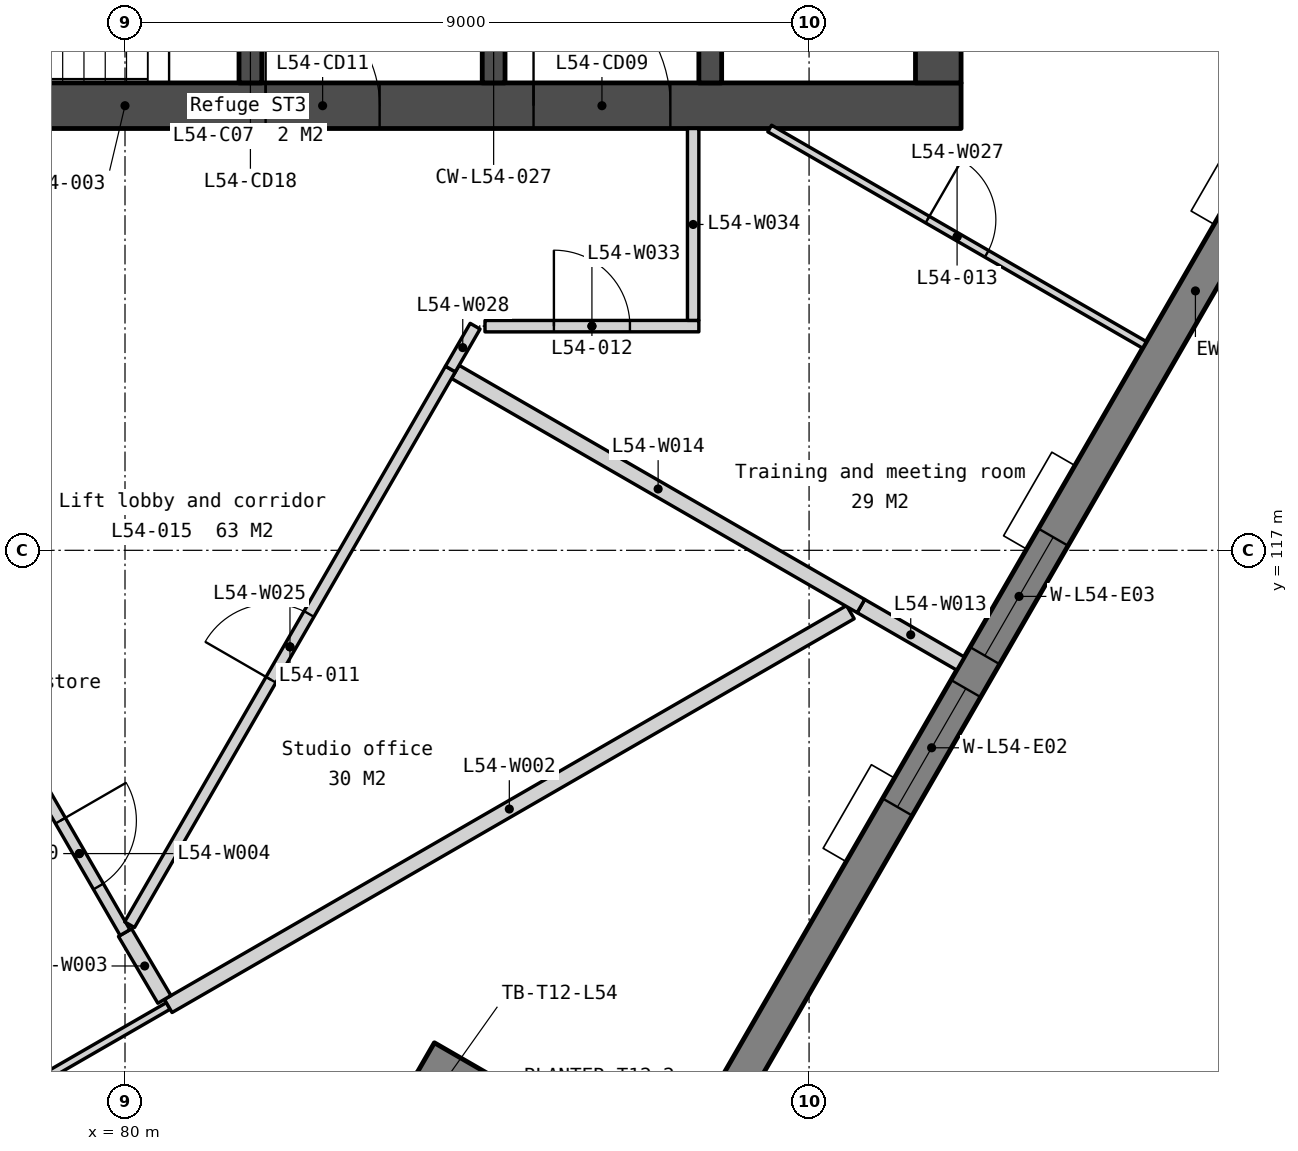
"""IFC4 building model, lengths in metres.
Left out: names, types, materials, properties, quantities, classifications, styles, units other than length and angle.
Written with IfcOpenShell. Run it as: python <this file> out.ifc"""

import sys

from ifc_helpers import new_model, si_unit, direction, frame, frame_2d, origin, place, context, subcontext, project, spatial, polyline, rectangle, outline, extrude, element, fill, save


model = new_model("IFC4")
c1 = context("Model", 3, precision=1e-05, world=origin(), true_north=direction((0.0, 1.0)))
c2 = subcontext(c1, "Body", "Model", "MODEL_VIEW")
j1 = project(units=[si_unit("LENGTHUNIT", "METRE"), si_unit("PLANEANGLEUNIT", "RADIAN")], contexts=[c1])
p1 = place(None, origin())
s1 = spatial("IfcSite", under=j1, at=p1, CompositionType="ELEMENT")
p2 = place(p1, origin())
s2 = spatial("IfcBuilding", under=s1, at=p2, CompositionType="ELEMENT")
p3 = place(p2, frame((0.0, 0.0, 215.3)))
s3 = spatial("IfcBuildingStorey", under=s2, at=p3, CompositionType="ELEMENT", Elevation=215.3)
p4 = place(p3, frame((69.0, 122.85, 0.0), z_axis=(0.0, 0.0, 1.0), x_axis=(1.0, 0.0, 0.0)))
e1 = element("IfcWall", 1, at=p4, inside=s3, PredefinedType="SOLIDWALL", context=c2, shape_type="SweptSolid", body=[
    extrude(rectangle(XDim=22.0, YDim=0.6, at=frame_2d((11.0, 0.0))), origin(), (0.0, 0.0, 1.0), 3.75),
])
p5 = place(p4, frame((16.375, 0.0, 0.0)))
e2 = element("IfcOpeningElement", 2, at=p5, cuts=e1, PredefinedType="OPENING", context=c2, shape_type="SweptSolid", body=[
    extrude(rectangle(XDim=1.8, YDim=2.1, at=frame_2d((0.9, 1.05))), frame((0.0, 0.31, 0.0), z_axis=(0.0, -1.0, 0.0), x_axis=(1.0, 0.0, 0.0)), (0.0, 0.0, 1.0), 0.62),
])
p6 = place(p4, frame((3.825, 0.0, 0.0)))
e3 = element("IfcOpeningElement", 3, at=p6, cuts=e1, PredefinedType="OPENING", context=c2, shape_type="SweptSolid", body=[
    extrude(rectangle(XDim=1.8, YDim=2.1, at=frame_2d((0.9, 1.05))), frame((0.0, 0.31, 0.0), z_axis=(0.0, -1.0, 0.0), x_axis=(1.0, 0.0, 0.0)), (0.0, 0.0, 1.0), 0.62),
])
p7 = place(p4, frame((12.85, 0.0, 0.0)))
e4 = element("IfcOpeningElement", 4, at=p7, cuts=e1, PredefinedType="OPENING", context=c2, shape_type="SweptSolid", body=[
    extrude(rectangle(XDim=1.5, YDim=2.1, at=frame_2d((0.75, 1.05))), frame((0.0, 0.31, 0.0), z_axis=(0.0, -1.0, 0.0), x_axis=(1.0, 0.0, 0.0)), (0.0, 0.0, 1.0), 0.62),
])
p8 = place(p3, frame((81.65, 125.7, 0.0), z_axis=(0.0, 0.0, 1.0), x_axis=(0.0, -1.0, 0.0)))
e5 = element("IfcWall", 5, at=p8, inside=s3, PredefinedType="SOLIDWALL", context=c2, shape_type="SweptSolid", body=[
    extrude(rectangle(XDim=2.55, YDim=0.3, at=frame_2d((1.275, 0.0))), origin(), (0.0, 0.0, 1.0), 3.75),
])
p9 = place(p8, frame((0.75, 0.0, 0.0)))
e6 = element("IfcOpeningElement", 6, at=p9, cuts=e5, PredefinedType="OPENING", context=c2, shape_type="SweptSolid", body=[
    extrude(rectangle(XDim=1.0, YDim=2.1, at=frame_2d((0.5, 1.05))), frame((0.0, 0.16, 0.0), z_axis=(0.0, -1.0, 0.0), x_axis=(1.0, 0.0, 0.0)), (0.0, 0.0, 1.0), 0.32),
])
p10 = place(p3, frame((84.85, 125.85, 0.0), z_axis=(0.0, 0.0, 1.0), x_axis=(0.0, -1.0, 0.0)))
e7 = element("IfcWall", 7, at=p10, inside=s3, PredefinedType="SOLIDWALL", context=c2, shape_type="SweptSolid", body=[
    extrude(rectangle(XDim=2.7, YDim=0.3, at=frame_2d((1.35, 0.0))), origin(), (0.0, 0.0, 1.0), 3.75),
])
p11 = place(p3, frame((87.7, 133.95, 0.0), z_axis=(0.0, 0.0, 1.0), x_axis=(0.0, -1.0, 0.0)))
e8 = element("IfcWall", 8, at=p11, inside=s3, PredefinedType="SOLIDWALL", context=c2, shape_type="SweptSolid", body=[
    extrude(rectangle(XDim=10.8, YDim=0.3, at=frame_2d((5.4, 0.0))), origin(), (0.0, 0.0, 1.0), 3.75),
])
p12 = place(p11, frame((6.95, 0.0, 0.0)))
e9 = element("IfcOpeningElement", 9, at=p12, cuts=e8, PredefinedType="OPENING", context=c2, shape_type="SweptSolid", body=[
    extrude(rectangle(XDim=1.1, YDim=2.1, at=frame_2d((0.55, 1.05))), frame((0.0, 0.16, 0.0), z_axis=(0.0, -1.0, 0.0), x_axis=(1.0, 0.0, 0.0)), (0.0, 0.0, 1.0), 0.32),
])
p13 = place(p11, frame((5.1, 0.0, 0.0)))
e10 = element("IfcOpeningElement", 10, at=p13, cuts=e8, PredefinedType="OPENING", context=c2, shape_type="SweptSolid", body=[
    extrude(rectangle(XDim=1.0, YDim=2.1, at=frame_2d((0.5, 1.05))), frame((0.0, 0.16, 0.0), z_axis=(0.0, -1.0, 0.0), x_axis=(1.0, 0.0, 0.0)), (0.0, 0.0, 1.0), 0.32),
])
p14 = place(p11, frame((9.25, 0.0, 0.0)))
e11 = element("IfcOpeningElement", 11, at=p14, cuts=e8, PredefinedType="OPENING", context=c2, shape_type="SweptSolid", body=[
    extrude(rectangle(XDim=1.1, YDim=2.1, at=frame_2d((0.55, 1.05))), frame((0.0, 0.16, 0.0), z_axis=(0.0, -1.0, 0.0), x_axis=(1.0, 0.0, 0.0)), (0.0, 0.0, 1.0), 0.32),
])
p15 = place(p3, frame((90.7, 133.95, 0.0), z_axis=(0.0, 0.0, 1.0), x_axis=(0.0, -1.0, 0.0)))
e12 = element("IfcWall", 12, at=p15, inside=s3, PredefinedType="SOLIDWALL", context=c2, shape_type="SweptSolid", body=[
    extrude(rectangle(XDim=10.8, YDim=0.6, at=frame_2d((5.4, 0.0))), origin(), (0.0, 0.0, 1.0), 3.75),
])
p16 = place(p3, frame((87.296, 108.658, -0.15), z_axis=(0.0, 0.0, 1.0), x_axis=(0.500003227337, 0.866023540472, 0.0)))
e13 = element("IfcWall", 13, at=p16, inside=s3, PredefinedType="SOLIDWALL", context=c2, shape_type="SweptSolid", body=[
    extrude(outline(polyline([(27.147, 3.9), (27.147, 0.0), (0.0, 0.0), (0.0, 3.9), (27.147, 3.9)])), frame((0.0, 0.225, 0.0), z_axis=(0.0, -1.0, 0.0), x_axis=(1.0, 0.0, 0.0)), (0.0, 0.0, 1.0), 0.45),
])
p17 = place(p16, frame((5.732, 0.0, 0.95)))
e14 = element("IfcOpeningElement", 14, at=p17, cuts=e13, PredefinedType="OPENING", context=c2, shape_type="SweptSolid", body=[
    extrude(rectangle(XDim=1.8, YDim=2.2, at=frame_2d((0.9, 1.1))), frame((0.0, 0.235, 0.0), z_axis=(0.0, -1.0, 0.0), x_axis=(1.0, 0.0, 0.0)), (0.0, 0.0, 1.0), 0.47),
])
p18 = place(p16, frame((8.032, 0.0, 0.95)))
e15 = element("IfcOpeningElement", 15, at=p18, cuts=e13, PredefinedType="OPENING", context=c2, shape_type="SweptSolid", body=[
    extrude(rectangle(XDim=1.8, YDim=2.2, at=frame_2d((0.9, 1.1))), frame((0.0, 0.235, 0.0), z_axis=(0.0, -1.0, 0.0), x_axis=(1.0, 0.0, 0.0)), (0.0, 0.0, 1.0), 0.47),
])
p19 = place(p16, frame((15.415, 0.0, 0.95)))
e16 = element("IfcOpeningElement", 16, at=p19, cuts=e13, PredefinedType="OPENING", context=c2, shape_type="SweptSolid", body=[
    extrude(rectangle(XDim=1.8, YDim=2.2, at=frame_2d((0.9, 1.1))), frame((0.0, 0.235, 0.0), z_axis=(0.0, -1.0, 0.0), x_axis=(1.0, 0.0, 0.0)), (0.0, 0.0, 1.0), 0.47),
])
p20 = place(p16, frame((17.715, 0.0, 0.95)))
e17 = element("IfcOpeningElement", 17, at=p20, cuts=e13, PredefinedType="OPENING", context=c2, shape_type="SweptSolid", body=[
    extrude(rectangle(XDim=1.8, YDim=2.2, at=frame_2d((0.9, 1.1))), frame((0.0, 0.235, 0.0), z_axis=(0.0, -1.0, 0.0), x_axis=(1.0, 0.0, 0.0)), (0.0, 0.0, 1.0), 0.47),
])
p21 = place(p16, frame((25.171, 0.0, 0.95)))
e18 = element("IfcOpeningElement", 18, at=p21, cuts=e13, PredefinedType="OPENING", context=c2, shape_type="SweptSolid", body=[
    extrude(rectangle(XDim=1.2, YDim=2.2, at=frame_2d((0.6, 1.1))), frame((0.0, 0.235, 0.0), z_axis=(0.0, -1.0, 0.0), x_axis=(1.0, 0.0, 0.0)), (0.0, 0.0, 1.0), 0.47),
])
p22 = place(p3, frame((87.379, 108.351, 0.0), z_axis=(0.0, 0.0, 1.0), x_axis=(-0.866047669374, 0.499961432884, 0.0)))
e19 = element("IfcWall", 19, at=p22, inside=s3, PredefinedType="SOLIDWALL", context=c2, shape_type="SweptSolid", body=[
    extrude(rectangle(XDim=3.95, YDim=0.45, at=frame_2d((1.975, 0.0))), origin(), (0.0, 0.0, 1.0), 7.65),
])
p23 = place(p3, frame((73.849, 107.125, 0.0), z_axis=(0.0, 0.0, 1.0), x_axis=(0.866027358884, 0.499996613652, 0.0)))
e20 = element("IfcWall", 20, at=p23, inside=s3, PredefinedType="PARTITIONING", context=c2, shape_type="SweptSolid", body=[
    extrude(rectangle(XDim=7.76, YDim=0.1, at=frame_2d((3.88, 0.0))), origin(), (0.0, 0.0, 1.0), 3.75),
])
p24 = place(p23, frame((3.43, 0.0, 0.0)))
e21 = element("IfcOpeningElement", 21, at=p24, cuts=e20, PredefinedType="OPENING", context=c2, shape_type="SweptSolid", body=[
    extrude(rectangle(XDim=0.9, YDim=2.1, at=frame_2d((0.45, 1.05))), frame((0.0, 0.06, 0.0), z_axis=(0.0, -1.0, 0.0), x_axis=(1.0, 0.0, 0.0)), (0.0, 0.0, 1.0), 0.12),
])
p25 = place(p3, frame((80.569, 111.005, 0.0), z_axis=(0.0, 0.0, 1.0), x_axis=(0.866025130863, 0.500000472714, 0.0)))
e22 = element("IfcWall", 22, at=p25, inside=s3, PredefinedType="PARTITIONING", context=c2, shape_type="SweptSolid", body=[
    extrude(rectangle(XDim=10.363, YDim=0.2, at=frame_2d((5.182, 0.0))), origin(), (0.0, 0.0, 1.0), 3.75),
])
p26 = place(p3, frame((80.0, 111.97, 0.0), z_axis=(0.0, 0.0, 1.0), x_axis=(0.507689136561, -0.861540330233, 0.0)))
e23 = element("IfcWall", 23, at=p26, inside=s3, PredefinedType="PARTITIONING", context=c2, shape_type="SweptSolid", body=[
    extrude(rectangle(XDim=1.021, YDim=0.2, at=frame_2d((0.51, 0.0))), origin(), (0.0, 0.0, 1.0), 3.75),
])
p27 = place(p3, frame((78.8, 114.049, 0.0), z_axis=(0.0, 0.0, 1.0), x_axis=(0.500001309137, -0.866024647952, 0.0)))
e24 = element("IfcWall", 24, at=p27, inside=s3, PredefinedType="PARTITIONING", context=c2, shape_type="SweptSolid", body=[
    extrude(rectangle(XDim=2.4, YDim=0.15, at=frame_2d((1.2, 0.0))), origin(), (0.0, 0.0, 1.0), 3.75),
])
p28 = place(p27, frame((0.7, 0.0, 0.0)))
e25 = element("IfcOpeningElement", 25, at=p28, cuts=e24, PredefinedType="OPENING", context=c2, shape_type="SweptSolid", body=[
    extrude(rectangle(XDim=1.0, YDim=2.1, at=frame_2d((0.5, 1.05))), frame((0.0, 0.085, 0.0), z_axis=(0.0, -1.0, 0.0), x_axis=(1.0, 0.0, 0.0)), (0.0, 0.0, 1.0), 0.17),
])
p29 = place(p3, frame((89.682, 116.267, 0.0), z_axis=(0.0, 0.0, 1.0), x_axis=(0.866000172474, -0.500043699366, 0.0)))
e26 = element("IfcWall", 26, at=p29, inside=s3, PredefinedType="PARTITIONING", context=c2, shape_type="SweptSolid", body=[
    extrude(rectangle(XDim=1.513, YDim=0.2, at=frame_2d((0.756, 0.0))), origin(), (0.0, 0.0, 1.0), 3.75),
])
p30 = place(p3, frame((84.346, 119.348, 0.0), z_axis=(0.0, 0.0, 1.0), x_axis=(0.866037793621, -0.49997853956, 0.0)))
e27 = element("IfcWall", 27, at=p30, inside=s3, PredefinedType="PARTITIONING", context=c2, shape_type="SweptSolid", body=[
    extrude(rectangle(XDim=6.162, YDim=0.2, at=frame_2d((3.081, 0.0))), origin(), (0.0, 0.0, 1.0), 3.75),
])
p31 = place(p3, frame((80.06, 112.074, 0.0), z_axis=(0.0, 0.0, 1.0), x_axis=(0.500005339912, 0.866022320763, 0.0)))
e28 = element("IfcWall", 28, at=p31, inside=s3, PredefinedType="PARTITIONING", context=c2, shape_type="SweptSolid", body=[
    extrude(rectangle(XDim=8.442, YDim=0.15, at=frame_2d((4.221, 0.0))), origin(), (0.0, 0.0, 1.0), 3.75),
])
p32 = place(p31, frame((3.721, 0.0, 0.0)))
e29 = element("IfcOpeningElement", 29, at=p32, cuts=e28, PredefinedType="OPENING", context=c2, shape_type="SweptSolid", body=[
    extrude(rectangle(XDim=1.0, YDim=2.1, at=frame_2d((0.5, 1.05))), frame((0.0, 0.085, 0.0), z_axis=(0.0, -1.0, 0.0), x_axis=(1.0, 0.0, 0.0)), (0.0, 0.0, 1.0), 0.17),
])
p33 = place(p3, frame((88.482, 122.55, 0.0), z_axis=(0.0, 0.0, 1.0), x_axis=(0.866023511746, -0.500003277092, 0.0)))
e30 = element("IfcWall", 30, at=p33, inside=s3, PredefinedType="PARTITIONING", context=c2, shape_type="SweptSolid", body=[
    extrude(rectangle(XDim=5.694, YDim=0.1, at=frame_2d((2.847, 0.0))), origin(), (0.0, 0.0, 1.0), 3.75),
])
p34 = place(p33, frame((2.397, 0.0, 0.0)))
e31 = element("IfcOpeningElement", 31, at=p34, cuts=e30, PredefinedType="OPENING", context=c2, shape_type="SweptSolid", body=[
    extrude(rectangle(XDim=0.9, YDim=2.1, at=frame_2d((0.45, 1.05))), frame((0.0, 0.06, 0.0), z_axis=(0.0, -1.0, 0.0), x_axis=(1.0, 0.0, 0.0)), (0.0, 0.0, 1.0), 0.12),
])
p35 = place(p3, frame((84.281, 119.385, 0.0), z_axis=(0.0, 0.0, 1.0), x_axis=(0.499971370958, 0.866041932139, 0.0)))
e32 = element("IfcWall", 32, at=p35, inside=s3, PredefinedType="PARTITIONING", context=c2, shape_type="SweptSolid", body=[
    extrude(rectangle(XDim=0.651, YDim=0.15, at=frame_2d((0.325, 0.0))), origin(), (0.0, 0.0, 1.0), 3.75),
])
p36 = place(p3, frame((84.736, 119.949, 0.0), z_axis=(0.0, 0.0, 1.0), x_axis=(0.999999939771, 0.000347071563, 0.0)))
e33 = element("IfcWall", 33, at=p36, inside=s3, PredefinedType="PARTITIONING", context=c2, shape_type="SweptSolid", body=[
    extrude(rectangle(XDim=2.814, YDim=0.15, at=frame_2d((1.407, 0.0))), origin(), (0.0, 0.0, 1.0), 3.75),
])
p37 = place(p36, frame((0.907, 0.0, 0.0)))
e34 = element("IfcOpeningElement", 34, at=p37, cuts=e33, PredefinedType="OPENING", context=c2, shape_type="SweptSolid", body=[
    extrude(rectangle(XDim=1.0, YDim=2.1, at=frame_2d((0.5, 1.05))), frame((0.0, 0.085, 0.0), z_axis=(0.0, -1.0, 0.0), x_axis=(1.0, 0.0, 0.0)), (0.0, 0.0, 1.0), 0.17),
])
p38 = place(p3, frame((87.475, 120.025, 0.0), z_axis=(0.0, 0.0, 1.0), x_axis=(9.6683747e-05, 0.999999995326, 0.0)))
e35 = element("IfcWall", 35, at=p38, inside=s3, PredefinedType="PARTITIONING", context=c2, shape_type="SweptSolid", body=[
    extrude(rectangle(XDim=2.525, YDim=0.15, at=frame_2d((1.263, 0.0))), origin(), (0.0, 0.0, 1.0), 3.75),
])
p39 = place(p5, origin())
e36 = element("IfcDoor", 36, at=p39, inside=s3, OperationType="DOUBLE_DOOR_DOUBLE_SWING", PredefinedType="DOOR", context=c2, shape_type="SweptSolid", body=[
    extrude(rectangle(XDim=1.8, YDim=2.1, at=frame_2d((0.9, 1.05))), frame((0.0, 0.025, 0.0), z_axis=(0.0, -1.0, 0.0), x_axis=(1.0, 0.0, 0.0)), (0.0, 0.0, 1.0), 0.05),
])
fill(e2, e36)
p40 = place(p7, origin())
e37 = element("IfcDoor", 37, at=p40, inside=s3, OperationType="DOUBLE_DOOR_DOUBLE_SWING", PredefinedType="DOOR", context=c2, shape_type="SweptSolid", body=[
    extrude(rectangle(XDim=1.5, YDim=2.1, at=frame_2d((0.75, 1.05))), frame((0.0, 0.025, 0.0), z_axis=(0.0, -1.0, 0.0), x_axis=(1.0, 0.0, 0.0)), (0.0, 0.0, 1.0), 0.05),
])
fill(e4, e37)
p41 = place(p17, origin())
e38 = element("IfcWindow", 38, at=p41, inside=s3, PartitioningType="SINGLE_PANEL", PredefinedType="WINDOW", context=c2, shape_type="SweptSolid", body=[
    extrude(rectangle(XDim=1.8, YDim=2.2, at=frame_2d((0.9, 1.1))), frame((0.0, 0.03, 0.0), z_axis=(0.0, -1.0, 0.0), x_axis=(1.0, 0.0, 0.0)), (0.0, 0.0, 1.0), 0.06),
])
fill(e14, e38)
p42 = place(p18, origin())
e39 = element("IfcWindow", 39, at=p42, inside=s3, PartitioningType="SINGLE_PANEL", PredefinedType="WINDOW", context=c2, shape_type="SweptSolid", body=[
    extrude(rectangle(XDim=1.8, YDim=2.2, at=frame_2d((0.9, 1.1))), frame((0.0, 0.03, 0.0), z_axis=(0.0, -1.0, 0.0), x_axis=(1.0, 0.0, 0.0)), (0.0, 0.0, 1.0), 0.06),
])
fill(e15, e39)
p43 = place(p28, origin())
e40 = element("IfcDoor", 40, at=p43, inside=s3, OperationType="SINGLE_SWING_LEFT", PredefinedType="DOOR", context=c2, shape_type="SweptSolid", body=[
    extrude(rectangle(XDim=1.0, YDim=2.1, at=frame_2d((0.5, 1.05))), frame((0.0, 0.025, 0.0), z_axis=(0.0, -1.0, 0.0), x_axis=(1.0, 0.0, 0.0)), (0.0, 0.0, 1.0), 0.05),
])
fill(e25, e40)
p44 = place(p32, origin())
e41 = element("IfcDoor", 41, at=p44, inside=s3, OperationType="SINGLE_SWING_LEFT", PredefinedType="DOOR", context=c2, shape_type="SweptSolid", body=[
    extrude(rectangle(XDim=1.0, YDim=2.1, at=frame_2d((0.5, 1.05))), frame((0.0, 0.025, 0.0), z_axis=(0.0, -1.0, 0.0), x_axis=(1.0, 0.0, 0.0)), (0.0, 0.0, 1.0), 0.05),
])
fill(e29, e41)
p45 = place(p37, origin())
e42 = element("IfcDoor", 42, at=p45, inside=s3, OperationType="SINGLE_SWING_LEFT", PredefinedType="DOOR", context=c2, shape_type="SweptSolid", body=[
    extrude(rectangle(XDim=1.0, YDim=2.1, at=frame_2d((0.5, 1.05))), frame((0.0, 0.025, 0.0), z_axis=(0.0, -1.0, 0.0), x_axis=(1.0, 0.0, 0.0)), (0.0, 0.0, 1.0), 0.05),
])
fill(e34, e42)
p46 = place(p34, origin())
e43 = element("IfcDoor", 43, at=p46, inside=s3, OperationType="SINGLE_SWING_LEFT", PredefinedType="DOOR", context=c2, shape_type="SweptSolid", body=[
    extrude(rectangle(XDim=0.9, YDim=2.1, at=frame_2d((0.45, 1.05))), frame((0.0, 0.025, 0.0), z_axis=(0.0, -1.0, 0.0), x_axis=(1.0, 0.0, 0.0)), (0.0, 0.0, 1.0), 0.05),
])
fill(e31, e43)
save(model, sys.argv[1])
